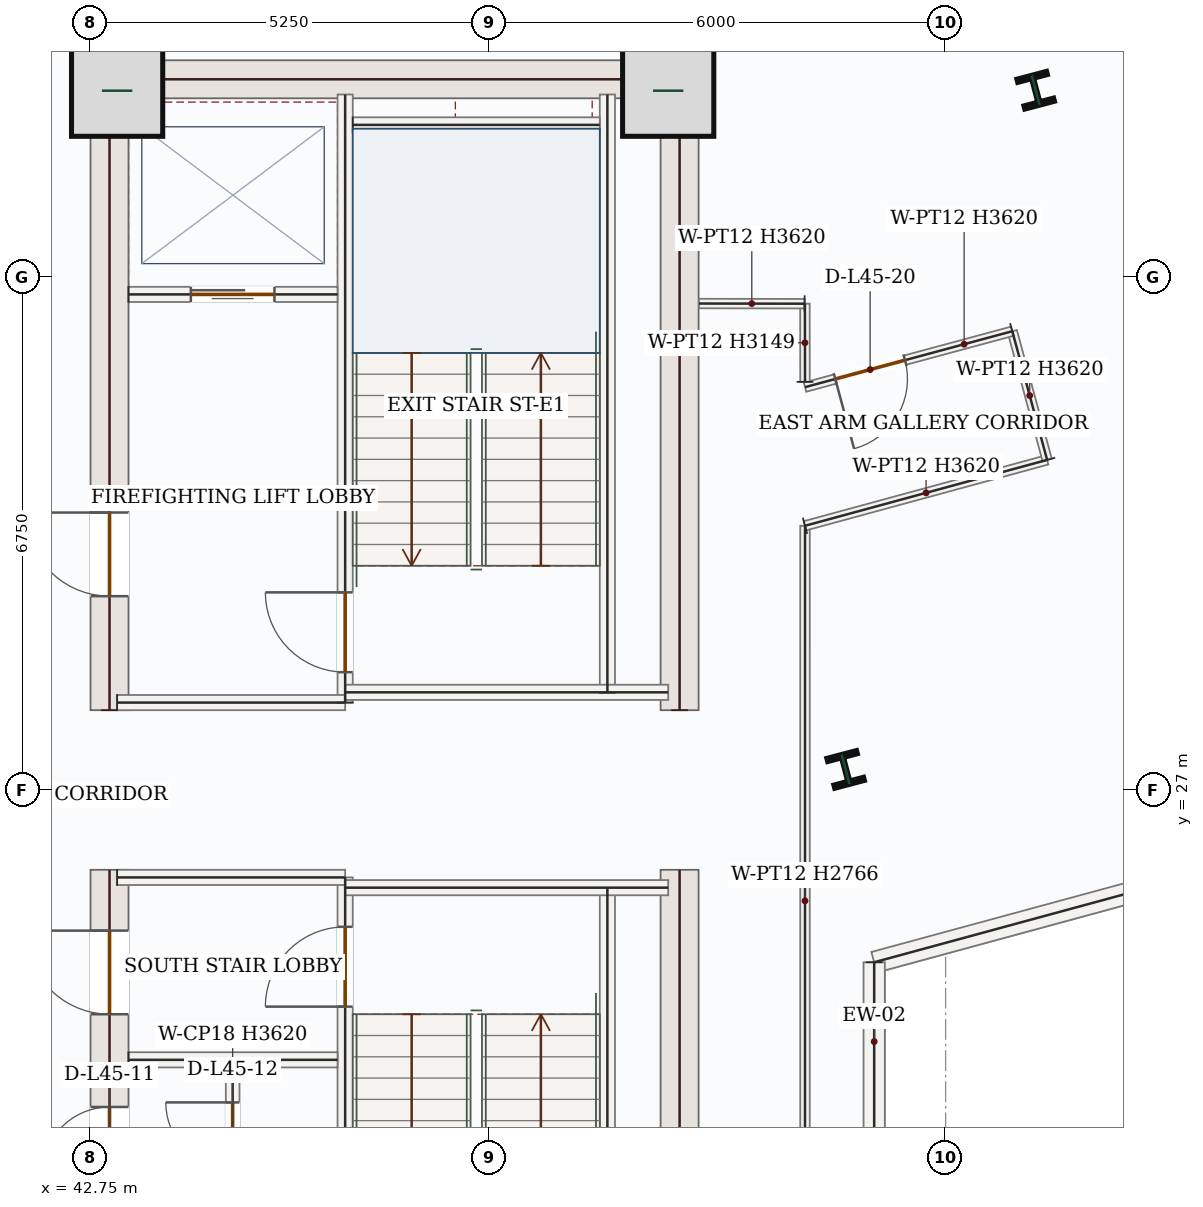
"""IFC4 building model, lengths in metres.
Left out: names, types, materials, properties, quantities, classifications, styles, units other than length and angle.
Written with IfcOpenShell. Run it as: python <this file> out.ifc"""

import sys

from ifc_helpers import new_model, si_unit, direction, frame, frame_2d, origin, origin_2d, place, context, subcontext, project, spatial, rectangle, i_section, extrude, source, transform, mapped, element, fill, save


model = new_model("IFC4")
c1 = context("Model", 3, precision=1e-05, world=origin(), true_north=direction((0.0, 1.0)))
c2 = subcontext(c1, "Body", "Model", "MODEL_VIEW")
j1 = project(units=[si_unit("LENGTHUNIT", "METRE"), si_unit("PLANEANGLEUNIT", "RADIAN")], contexts=[c1])
p1 = place(None, origin())
s1 = spatial("IfcSite", under=j1, at=p1, CompositionType="ELEMENT")
p2 = place(p1, origin())
s2 = spatial("IfcBuilding", under=s1, at=p2, CompositionType="ELEMENT")
p3 = place(p2, frame((0.0, 0.0, 194.1)))
s3 = spatial("IfcBuildingStorey", under=s2, at=p3, CompositionType="ELEMENT", Elevation=194.1)
p4 = place(p3, frame((43.0, 17.4, 0.0), z_axis=(0.0, 0.0, 1.0), x_axis=(0.0, 1.0, 0.0)))
e1 = element("IfcWall", 1, at=p4, inside=s3, PredefinedType="SHEAR", context=c2, shape_type="SweptSolid", body=[
    extrude(rectangle(XDim=8.55, YDim=0.5, at=frame_2d((4.275, 0.0))), origin(), (0.0, 0.0, 1.0), 3.62),
])
p5 = place(p4, frame((6.65, 0.0, 0.0)))
e2 = element("IfcOpeningElement", 2, at=p5, cuts=e1, PredefinedType="OPENING", context=c2, shape_type="SweptSolid", body=[
    extrude(rectangle(XDim=1.1, YDim=2.2, at=frame_2d((0.55, 1.1))), frame((0.0, 0.26, 0.0), z_axis=(0.0, -1.0, 0.0), x_axis=(1.0, 0.0, 0.0)), (0.0, 0.0, 1.0), 0.52),
])
p6 = place(p4, frame((1.75, 0.0, 0.0)))
e3 = element("IfcOpeningElement", 3, at=p6, cuts=e1, PredefinedType="OPENING", context=c2, shape_type="SweptSolid", body=[
    extrude(rectangle(XDim=1.3, YDim=2.2, at=frame_2d((0.65, 1.1))), frame((0.0, 0.26, 0.0), z_axis=(0.0, -1.0, 0.0), x_axis=(1.0, 0.0, 0.0)), (0.0, 0.0, 1.0), 0.52),
])
p7 = place(p4, frame((4.55, 0.0, 0.0)))
e4 = element("IfcOpeningElement", 4, at=p7, cuts=e1, PredefinedType="OPENING", context=c2, shape_type="SweptSolid", body=[
    extrude(rectangle(XDim=0.88, YDim=2.1, at=frame_2d((0.44, 1.05))), frame((0.0, 0.26, 0.0), z_axis=(0.0, -1.0, 0.0), x_axis=(1.0, 0.0, 0.0)), (0.0, 0.0, 1.0), 0.52),
])
p8 = place(p3, frame((43.0, 28.05, 0.0), z_axis=(0.0, 0.0, 1.0), x_axis=(0.0, 1.0, 0.0)))
e5 = element("IfcWall", 5, at=p8, inside=s3, PredefinedType="SHEAR", context=c2, shape_type="SweptSolid", body=[
    extrude(rectangle(XDim=8.55, YDim=0.5, at=frame_2d((4.275, 0.0))), origin(), (0.0, 0.0, 1.0), 3.62),
])
p9 = place(p8, frame((1.5, 0.0, 0.0)))
e6 = element("IfcOpeningElement", 6, at=p9, cuts=e5, PredefinedType="OPENING", context=c2, shape_type="SweptSolid", body=[
    extrude(rectangle(XDim=1.1, YDim=2.2, at=frame_2d((0.55, 1.1))), frame((0.0, 0.26, 0.0), z_axis=(0.0, -1.0, 0.0), x_axis=(1.0, 0.0, 0.0)), (0.0, 0.0, 1.0), 0.52),
])
m1 = source(origin(), c2, "Body", "SweptSolid", [
    extrude(rectangle(XDim=8.55, YDim=0.5, at=frame_2d((4.275, 0.0))), origin(), (0.0, 0.0, 1.0), 3.62),
])
for number, where, z_axis, x_axis in (
    (7, (50.5, 17.4, 0.0), (0.0, 0.0, 1.0), (0.0, 1.0, 0.0)),
    (8, (50.5, 28.05, 0.0), (0.0, 0.0, 1.0), (0.0, 1.0, 0.0)),
):
    element("IfcWall", number, at=place(p3, frame(where, z_axis=z_axis, x_axis=x_axis)), inside=s3, PredefinedType="SHEAR", context=c2, shape_type="MappedRepresentation", body=[
        mapped(m1, transform((0.0, 0.0, 0.0), x_axis=(1.0, 0.0, 0.0), y_axis=(0.0, 1.0, 0.0), z_axis=(0.0, 0.0, 1.0), scale=1.0)),
    ])
m2 = source(origin(), c2, "Body", "SweptSolid", [
    extrude(rectangle(XDim=7.0, YDim=0.5, at=frame_2d((3.5, 0.0))), origin(), (0.0, 0.0, 1.0), 3.62),
])
p10 = place(p3, frame((43.25, 36.35, 0.0), z_axis=(0.0, 0.0, 1.0), x_axis=(1.0, 0.0, 0.0)))
e9 = element("IfcWall", 9, at=p10, inside=s3, PredefinedType="SHEAR", context=c2, shape_type="MappedRepresentation", body=[
    mapped(m2, transform((0.0, 0.0, 0.0), x_axis=(1.0, 0.0, 0.0), y_axis=(0.0, 1.0, 0.0), z_axis=(0.0, 0.0, 1.0), scale=1.0)),
])
m3 = source(origin(), c2, "Body", "SweptSolid", [
    extrude(rectangle(XDim=1.2, YDim=1.2, at=origin_2d()), origin(), (0.0, 0.0, 1.0), 3.9),
])
for number, where, z_axis, x_axis in (
    (10, (43.1, 36.2, 0.0), (0.0, 0.0, 1.0), (1.0, 0.0, 0.0)),
    (11, (50.35, 36.2, 0.0), (0.0, 0.0, 1.0), (1.0, 0.0, 0.0)),
):
    element("IfcColumn", number, at=place(p3, frame(where, z_axis=z_axis, x_axis=x_axis)), inside=s3, PredefinedType="COLUMN", context=c2, shape_type="MappedRepresentation", body=[
        mapped(m3, transform((0.0, 0.0, 0.0), x_axis=(1.0, 0.0, 0.0), y_axis=(0.0, 1.0, 0.0), z_axis=(0.0, 0.0, 1.0), scale=1.0)),
    ])
m4 = source(origin(), c2, "Body", "SweptSolid", [
    extrude(i_section(OverallWidth=0.404, OverallDepth=0.407, WebThickness=0.027, FlangeThickness=0.044, FilletRadius=0.018, at=origin_2d()), origin(), (0.0, 0.0, 1.0), 3.9),
])
for number, where, z_axis, x_axis in (
    (12, (52.684, 27.271, 0.0), (0.0, 0.0, 1.0), (0.967, 0.255, 0.0)),
    (13, (55.185, 36.206, 0.0), (0.0, 0.0, 1.0), (0.967, 0.255, 0.0)),
):
    element("IfcColumn", number, at=place(p3, frame(where, z_axis=z_axis, x_axis=x_axis)), inside=s3, PredefinedType="COLUMN", context=c2, shape_type="MappedRepresentation", body=[
        mapped(m4, transform((0.0, 0.0, 0.0), x_axis=(1.0, 0.0, 0.0), y_axis=(0.0, 1.0, 0.0), z_axis=(0.0, 0.0, 1.0), scale=1.0)),
    ])
p11 = place(p3, frame((62.026, 27.17, 0.0), z_axis=(0.0, 0.0, 1.0), x_axis=(-0.965014433153, -0.262196765439, 0.0)))
e14 = element("IfcWall", 14, at=p11, inside=s3, PredefinedType="SOLIDWALL", context=c2, shape_type="SweptSolid", body=[
    extrude(rectangle(XDim=9.291, YDim=0.28, at=frame_2d((4.646, 0.0))), origin(), (0.0, 0.0, 1.0), 3.62),
])
p12 = place(p11, frame((3.746, 0.0, 0.85)))
e15 = element("IfcOpeningElement", 15, at=p12, cuts=e14, PredefinedType="OPENING", context=c2, shape_type="SweptSolid", body=[
    extrude(rectangle(XDim=1.8, YDim=1.75, at=frame_2d((0.9, 0.875))), frame((0.0, 0.15, 0.0), z_axis=(0.0, -1.0, 0.0), x_axis=(1.0, 0.0, 0.0)), (0.0, 0.0, 1.0), 0.3),
])
p13 = place(p3, frame((53.06, 24.734, 0.0), z_axis=(0.0, 0.0, 1.0), x_axis=(0.0, -1.0, 0.0)))
e16 = element("IfcWall", 16, at=p13, inside=s3, PredefinedType="SOLIDWALL", context=c2, shape_type="SweptSolid", body=[
    extrude(rectangle(XDim=6.276, YDim=0.28, at=frame_2d((3.138, 0.0))), origin(), (0.0, 0.0, 1.0), 3.62),
])
p14 = place(p13, frame((2.238, 0.0, 0.85)))
e17 = element("IfcOpeningElement", 17, at=p14, cuts=e16, PredefinedType="OPENING", context=c2, shape_type="SweptSolid", body=[
    extrude(rectangle(XDim=1.8, YDim=1.75, at=frame_2d((0.9, 0.875))), frame((0.0, 0.15, 0.0), z_axis=(0.0, -1.0, 0.0), x_axis=(1.0, 0.0, 0.0)), (0.0, 0.0, 1.0), 0.3),
])
m5 = source(origin(), c2, "Body", "SweptSolid", [
    extrude(rectangle(XDim=7.87, YDim=0.2, at=frame_2d((3.935, 0.0))), origin(), (0.0, 0.0, 1.0), 3.62),
])
for number, where, z_axis, x_axis in (
    (18, (49.55, 17.85, 0.0), (0.0, 0.0, 1.0), (0.0, 1.0, 0.0)),
    (19, (49.55, 28.28, 0.0), (0.0, 0.0, 1.0), (0.0, 1.0, 0.0)),
):
    element("IfcWall", number, at=place(p3, frame(where, z_axis=z_axis, x_axis=x_axis)), inside=s3, PredefinedType="SOLIDWALL", context=c2, shape_type="MappedRepresentation", body=[
        mapped(m5, transform((0.0, 0.0, 0.0), x_axis=(1.0, 0.0, 0.0), y_axis=(0.0, 1.0, 0.0), z_axis=(0.0, 0.0, 1.0), scale=1.0)),
    ])
p15 = place(p3, frame((46.1, 17.85, 0.0), z_axis=(0.0, 0.0, 1.0), x_axis=(0.0, 1.0, 0.0)))
e20 = element("IfcWall", 20, at=p15, inside=s3, PredefinedType="SOLIDWALL", context=c2, shape_type="SweptSolid", body=[
    extrude(rectangle(XDim=8.0, YDim=0.2, at=frame_2d((4.0, 0.0))), origin(), (0.0, 0.0, 1.0), 3.62),
])
p16 = place(p15, frame((6.3, 0.0, 0.0)))
e21 = element("IfcOpeningElement", 21, at=p16, cuts=e20, PredefinedType="OPENING", context=c2, shape_type="SweptSolid", body=[
    extrude(rectangle(XDim=1.05, YDim=2.15, at=frame_2d((0.525, 1.075))), frame((0.0, 0.11, 0.0), z_axis=(0.0, -1.0, 0.0), x_axis=(1.0, 0.0, 0.0)), (0.0, 0.0, 1.0), 0.22),
])
p17 = place(p3, frame((46.1, 28.15, 0.0), z_axis=(0.0, 0.0, 1.0), x_axis=(0.0, 1.0, 0.0)))
e22 = element("IfcWall", 22, at=p17, inside=s3, PredefinedType="SOLIDWALL", context=c2, shape_type="SweptSolid", body=[
    extrude(rectangle(XDim=8.0, YDim=0.2, at=frame_2d((4.0, 0.0))), origin(), (0.0, 0.0, 1.0), 3.62),
])
p18 = place(p17, frame((0.4, 0.0, 0.0)))
e23 = element("IfcOpeningElement", 23, at=p18, cuts=e22, PredefinedType="OPENING", context=c2, shape_type="SweptSolid", body=[
    extrude(rectangle(XDim=1.05, YDim=2.15, at=frame_2d((0.525, 1.075))), frame((0.0, 0.11, 0.0), z_axis=(0.0, -1.0, 0.0), x_axis=(1.0, 0.0, 0.0)), (0.0, 0.0, 1.0), 0.22),
])
m6 = source(origin(), c2, "Body", "SweptSolid", [
    extrude(rectangle(XDim=3.0, YDim=0.2, at=frame_2d((1.5, 0.0))), origin(), (0.0, 0.0, 1.0), 3.62),
])
p19 = place(p3, frame((43.1, 25.85, 0.0), z_axis=(0.0, 0.0, 1.0), x_axis=(1.0, 0.0, 0.0)))
e24 = element("IfcWall", 24, at=p19, inside=s3, PredefinedType="SOLIDWALL", context=c2, shape_type="MappedRepresentation", body=[
    mapped(m6, transform((0.0, 0.0, 0.0), x_axis=(1.0, 0.0, 0.0), y_axis=(0.0, 1.0, 0.0), z_axis=(0.0, 0.0, 1.0), scale=1.0)),
])
m7 = source(origin(), c2, "Body", "SweptSolid", [
    extrude(rectangle(XDim=4.25, YDim=0.2, at=frame_2d((2.125, 0.0))), origin(), (0.0, 0.0, 1.0), 3.62),
])
p20 = place(p3, frame((46.1, 25.715, 0.0), z_axis=(0.0, 0.0, 1.0), x_axis=(1.0, 0.0, 0.0)))
e25 = element("IfcWall", 25, at=p20, inside=s3, PredefinedType="SOLIDWALL", context=c2, shape_type="MappedRepresentation", body=[
    mapped(m7, transform((0.0, 0.0, 0.0), x_axis=(1.0, 0.0, 0.0), y_axis=(0.0, 1.0, 0.0), z_axis=(0.0, 0.0, 1.0), scale=1.0)),
])
p21 = place(p3, frame((43.1, 28.15, 0.0), z_axis=(0.0, 0.0, 1.0), x_axis=(1.0, 0.0, 0.0)))
e26 = element("IfcWall", 26, at=p21, inside=s3, PredefinedType="SOLIDWALL", context=c2, shape_type="MappedRepresentation", body=[
    mapped(m6, transform((0.0, 0.0, 0.0), x_axis=(1.0, 0.0, 0.0), y_axis=(0.0, 1.0, 0.0), z_axis=(0.0, 0.0, 1.0), scale=1.0)),
])
p22 = place(p3, frame((46.1, 28.285, 0.0), z_axis=(0.0, 0.0, 1.0), x_axis=(1.0, 0.0, 0.0)))
e27 = element("IfcWall", 27, at=p22, inside=s3, PredefinedType="SOLIDWALL", context=c2, shape_type="MappedRepresentation", body=[
    mapped(m7, transform((0.0, 0.0, 0.0), x_axis=(1.0, 0.0, 0.0), y_axis=(0.0, 1.0, 0.0), z_axis=(0.0, 0.0, 1.0), scale=1.0)),
])
m8 = source(origin(), c2, "Body", "SweptSolid", [
    extrude(rectangle(XDim=3.25, YDim=0.2, at=frame_2d((1.625, 0.0))), origin(), (0.0, 0.0, 1.0), 3.62),
])
p23 = place(p3, frame((46.2, 35.75, 0.0), z_axis=(0.0, 0.0, 1.0), x_axis=(1.0, 0.0, 0.0)))
e28 = element("IfcWall", 28, at=p23, inside=s3, PredefinedType="SOLIDWALL", context=c2, shape_type="MappedRepresentation", body=[
    mapped(m8, transform((0.0, 0.0, 0.0), x_axis=(1.0, 0.0, 0.0), y_axis=(0.0, 1.0, 0.0), z_axis=(0.0, 0.0, 1.0), scale=1.0)),
])
p24 = place(p3, frame((43.25, 33.52, 0.0), z_axis=(0.0, 0.0, 1.0), x_axis=(1.0, 0.0, 0.0)))
e29 = element("IfcWall", 29, at=p24, inside=s3, PredefinedType="SOLIDWALL", context=c2, shape_type="SweptSolid", body=[
    extrude(rectangle(XDim=2.75, YDim=0.2, at=frame_2d((1.375, 0.0))), origin(), (0.0, 0.0, 1.0), 3.62),
])
p25 = place(p24, frame((0.82, 0.0, 0.0)))
e30 = element("IfcOpeningElement", 30, at=p25, cuts=e29, PredefinedType="OPENING", context=c2, shape_type="SweptSolid", body=[
    extrude(rectangle(XDim=1.1, YDim=2.15, at=frame_2d((0.55, 1.075))), frame((0.0, 0.11, 0.0), z_axis=(0.0, -1.0, 0.0), x_axis=(1.0, 0.0, 0.0)), (0.0, 0.0, 1.0), 0.22),
])
m9 = source(origin(), c2, "Body", "SweptSolid", [
    extrude(rectangle(XDim=2.75, YDim=0.2, at=frame_2d((1.375, 0.0))), origin(), (0.0, 0.0, 1.0), 3.62),
])
p26 = place(p3, frame((43.25, 23.45, 0.0), z_axis=(0.0, 0.0, 1.0), x_axis=(1.0, 0.0, 0.0)))
e31 = element("IfcWall", 31, at=p26, inside=s3, PredefinedType="SOLIDWALL", context=c2, shape_type="MappedRepresentation", body=[
    mapped(m9, transform((0.0, 0.0, 0.0), x_axis=(1.0, 0.0, 0.0), y_axis=(0.0, 1.0, 0.0), z_axis=(0.0, 0.0, 1.0), scale=1.0)),
])
p27 = place(p3, frame((44.62, 21.55, 0.0), z_axis=(0.0, 0.0, 1.0), x_axis=(0.0, 1.0, 0.0)))
e32 = element("IfcWall", 32, at=p27, inside=s3, PredefinedType="PARTITIONING", context=c2, shape_type="SweptSolid", body=[
    extrude(rectangle(XDim=1.8, YDim=0.18, at=frame_2d((0.9, 0.0))), origin(), (0.0, 0.0, 1.0), 3.62),
])
p28 = place(p27, frame((0.46, 0.0, 0.0)))
e33 = element("IfcOpeningElement", 33, at=p28, cuts=e32, PredefinedType="OPENING", context=c2, shape_type="SweptSolid", body=[
    extrude(rectangle(XDim=0.88, YDim=2.1, at=frame_2d((0.44, 1.05))), frame((0.0, 0.1, 0.0), z_axis=(0.0, -1.0, 0.0), x_axis=(1.0, 0.0, 0.0)), (0.0, 0.0, 1.0), 0.2),
])
m10 = source(origin(), c2, "Body", "SweptSolid", [
    extrude(rectangle(XDim=9.868, YDim=0.125, at=frame_2d((4.934, 0.0))), origin(), (0.0, 0.0, 1.0), 2.766),
])
p29 = place(p3, frame((52.15, 20.608, 0.0), z_axis=(0.0, 0.0, 1.0), x_axis=(2.4739616e-05, 0.999999999694, 0.0)))
e34 = element("IfcWall", 34, at=p29, inside=s3, PredefinedType="PARTITIONING", context=c2, shape_type="MappedRepresentation", body=[
    mapped(m10, transform((0.0, 0.0, 0.0), x_axis=(1.0, 0.0, 0.0), y_axis=(0.0, 1.0, 0.0), z_axis=(0.0, 0.0, 1.0), scale=1.0)),
])
m11 = source(origin(), c2, "Body", "SweptSolid", [
    extrude(rectangle(XDim=3.301, YDim=0.125, at=frame_2d((1.65, 0.0))), origin(), (0.0, 0.0, 1.0), 3.62),
])
p30 = place(p3, frame((52.15, 30.476, 0.0), z_axis=(0.0, 0.0, 1.0), x_axis=(0.964918963187, 0.262547889884, 0.0)))
e35 = element("IfcWall", 35, at=p30, inside=s3, PredefinedType="PARTITIONING", context=c2, shape_type="MappedRepresentation", body=[
    mapped(m11, transform((0.0, 0.0, 0.0), x_axis=(1.0, 0.0, 0.0), y_axis=(0.0, 1.0, 0.0), z_axis=(0.0, 0.0, 1.0), scale=1.0)),
])
m12 = source(origin(), c2, "Body", "SweptSolid", [
    extrude(rectangle(XDim=1.754, YDim=0.125, at=frame_2d((0.877, 0.0))), origin(), (0.0, 0.0, 1.0), 3.62),
])
p31 = place(p3, frame((55.335, 31.343, 0.0), z_axis=(0.0, 0.0, 1.0), x_axis=(-0.261585705111, 0.965180252016, 0.0)))
e36 = element("IfcWall", 36, at=p31, inside=s3, PredefinedType="PARTITIONING", context=c2, shape_type="MappedRepresentation", body=[
    mapped(m12, transform((0.0, 0.0, 0.0), x_axis=(1.0, 0.0, 0.0), y_axis=(0.0, 1.0, 0.0), z_axis=(0.0, 0.0, 1.0), scale=1.0)),
])
p32 = place(p3, frame((54.877, 33.035, 0.0), z_axis=(0.0, 0.0, 1.0), x_axis=(-0.965486271956, -0.260453947301, 0.0)))
e37 = element("IfcWall", 37, at=p32, inside=s3, PredefinedType="PARTITIONING", context=c2, shape_type="SweptSolid", body=[
    extrude(rectangle(XDim=2.824, YDim=0.125, at=frame_2d((1.412, 0.0))), origin(), (0.0, 0.0, 1.0), 3.62),
])
p33 = place(p32, frame((1.462, 0.0, 0.0)))
e38 = element("IfcOpeningElement", 38, at=p33, cuts=e37, PredefinedType="OPENING", context=c2, shape_type="SweptSolid", body=[
    extrude(rectangle(XDim=0.95, YDim=2.15, at=frame_2d((0.475, 1.075))), frame((0.0, 0.073, 0.0), z_axis=(0.0, -1.0, 0.0), x_axis=(1.0, 0.0, 0.0)), (0.0, 0.0, 1.0), 0.145),
])
m13 = source(origin(), c2, "Body", "SweptSolid", [
    extrude(rectangle(XDim=1.028, YDim=0.125, at=frame_2d((0.514, 0.0))), origin(), (0.0, 0.0, 1.0), 3.149),
])
p34 = place(p3, frame((52.15, 32.37, 0.0), z_axis=(0.0, 0.0, 1.0), x_axis=(-0.001187365584, 0.999999295081, 0.0)))
e39 = element("IfcWall", 39, at=p34, inside=s3, PredefinedType="PARTITIONING", context=c2, shape_type="MappedRepresentation", body=[
    mapped(m13, transform((0.0, 0.0, 0.0), x_axis=(1.0, 0.0, 0.0), y_axis=(0.0, 1.0, 0.0), z_axis=(0.0, 0.0, 1.0), scale=1.0)),
])
m14 = source(origin(), c2, "Body", "SweptSolid", [
    extrude(rectangle(XDim=1.39, YDim=0.125, at=frame_2d((0.695, 0.0))), origin(), (0.0, 0.0, 1.0), 3.62),
])
p35 = place(p3, frame((52.145, 33.398, 0.0), z_axis=(0.0, 0.0, 1.0), x_axis=(-0.999998750398, 0.001580886835, 0.0)))
e40 = element("IfcWall", 40, at=p35, inside=s3, PredefinedType="PARTITIONING", context=c2, shape_type="MappedRepresentation", body=[
    mapped(m14, transform((0.0, 0.0, 0.0), x_axis=(1.0, 0.0, 0.0), y_axis=(0.0, 1.0, 0.0), z_axis=(0.0, 0.0, 1.0), scale=1.0)),
])
m15 = source(origin(), c2, "Body", "SweptSolid", [
    extrude(rectangle(XDim=1.05, YDim=2.15, at=frame_2d((0.525, 1.075))), frame((0.0, 0.025, 0.0), z_axis=(0.0, -1.0, 0.0), x_axis=(1.0, 0.0, 0.0)), (0.0, 0.0, 1.0), 0.05),
])
p36 = place(p18, origin())
e41 = element("IfcDoor", 41, at=p36, inside=s3, OperationType="SINGLE_SWING_RIGHT", PredefinedType="DOOR", context=c2, shape_type="MappedRepresentation", body=[
    mapped(m15, transform((0.0, 0.0, 0.0), x_axis=(1.0, 0.0, 0.0), y_axis=(0.0, 1.0, 0.0), z_axis=(0.0, 0.0, 1.0), scale=1.0)),
])
fill(e23, e41)
p37 = place(p16, origin())
e42 = element("IfcDoor", 42, at=p37, inside=s3, OperationType="SINGLE_SWING_LEFT", PredefinedType="DOOR", context=c2, shape_type="MappedRepresentation", body=[
    mapped(m15, transform((0.0, 0.0, 0.0), x_axis=(1.0, 0.0, 0.0), y_axis=(0.0, 1.0, 0.0), z_axis=(0.0, 0.0, 1.0), scale=1.0)),
])
fill(e21, e42)
m16 = source(origin(), c2, "Body", "SweptSolid", [
    extrude(rectangle(XDim=1.1, YDim=2.15, at=frame_2d((0.55, 1.075))), frame((0.0, 0.025, 0.0), z_axis=(0.0, -1.0, 0.0), x_axis=(1.0, 0.0, 0.0)), (0.0, 0.0, 1.0), 0.05),
])
p38 = place(p25, origin())
e43 = element("IfcDoor", 43, at=p38, inside=s3, OperationType="DOUBLE_DOOR_SLIDING", PredefinedType="DOOR", context=c2, shape_type="MappedRepresentation", body=[
    mapped(m16, transform((0.0, 0.0, 0.0), x_axis=(1.0, 0.0, 0.0), y_axis=(0.0, 1.0, 0.0), z_axis=(0.0, 0.0, 1.0), scale=1.0)),
])
fill(e30, e43)
m17 = source(origin(), c2, "Body", "SweptSolid", [
    extrude(rectangle(XDim=1.1, YDim=2.2, at=frame_2d((0.55, 1.1))), frame((0.0, 0.025, 0.0), z_axis=(0.0, -1.0, 0.0), x_axis=(1.0, 0.0, 0.0)), (0.0, 0.0, 1.0), 0.05),
])
p39 = place(p9, origin())
e44 = element("IfcDoor", 44, at=p39, inside=s3, OperationType="SINGLE_SWING_RIGHT", PredefinedType="DOOR", context=c2, shape_type="MappedRepresentation", body=[
    mapped(m17, transform((0.0, 0.0, 0.0), x_axis=(1.0, 0.0, 0.0), y_axis=(0.0, 1.0, 0.0), z_axis=(0.0, 0.0, 1.0), scale=1.0)),
])
fill(e6, e44)
p40 = place(p5, origin())
e45 = element("IfcDoor", 45, at=p40, inside=s3, OperationType="SINGLE_SWING_RIGHT", PredefinedType="DOOR", context=c2, shape_type="MappedRepresentation", body=[
    mapped(m17, transform((0.0, 0.0, 0.0), x_axis=(1.0, 0.0, 0.0), y_axis=(0.0, 1.0, 0.0), z_axis=(0.0, 0.0, 1.0), scale=1.0)),
])
fill(e2, e45)
m18 = source(origin(), c2, "Body", "SweptSolid", [
    extrude(rectangle(XDim=0.88, YDim=2.1, at=frame_2d((0.44, 1.05))), frame((0.0, 0.025, 0.0), z_axis=(0.0, -1.0, 0.0), x_axis=(1.0, 0.0, 0.0)), (0.0, 0.0, 1.0), 0.05),
])
p41 = place(p7, origin())
e46 = element("IfcDoor", 46, at=p41, inside=s3, OperationType="SINGLE_SWING_LEFT", PredefinedType="DOOR", context=c2, shape_type="MappedRepresentation", body=[
    mapped(m18, transform((0.0, 0.0, 0.0), x_axis=(1.0, 0.0, 0.0), y_axis=(0.0, 1.0, 0.0), z_axis=(0.0, 0.0, 1.0), scale=1.0)),
])
fill(e4, e46)
p42 = place(p28, origin())
e47 = element("IfcDoor", 47, at=p42, inside=s3, OperationType="SINGLE_SWING_RIGHT", PredefinedType="DOOR", context=c2, shape_type="MappedRepresentation", body=[
    mapped(m18, transform((0.0, 0.0, 0.0), x_axis=(1.0, 0.0, 0.0), y_axis=(0.0, 1.0, 0.0), z_axis=(0.0, 0.0, 1.0), scale=1.0)),
])
fill(e33, e47)
m19 = source(origin(), c2, "Body", "SweptSolid", [
    extrude(rectangle(XDim=0.95, YDim=2.15, at=frame_2d((0.475, 1.075))), frame((0.0, 0.025, 0.0), z_axis=(0.0, -1.0, 0.0), x_axis=(1.0, 0.0, 0.0)), (0.0, 0.0, 1.0), 0.05),
])
p43 = place(p33, origin())
e48 = element("IfcDoor", 48, at=p43, inside=s3, OperationType="SINGLE_SWING_RIGHT", PredefinedType="DOOR", context=c2, shape_type="MappedRepresentation", body=[
    mapped(m19, transform((0.0, 0.0, 0.0), x_axis=(1.0, 0.0, 0.0), y_axis=(0.0, 1.0, 0.0), z_axis=(0.0, 0.0, 1.0), scale=1.0)),
])
fill(e38, e48)
save(model, sys.argv[1])
